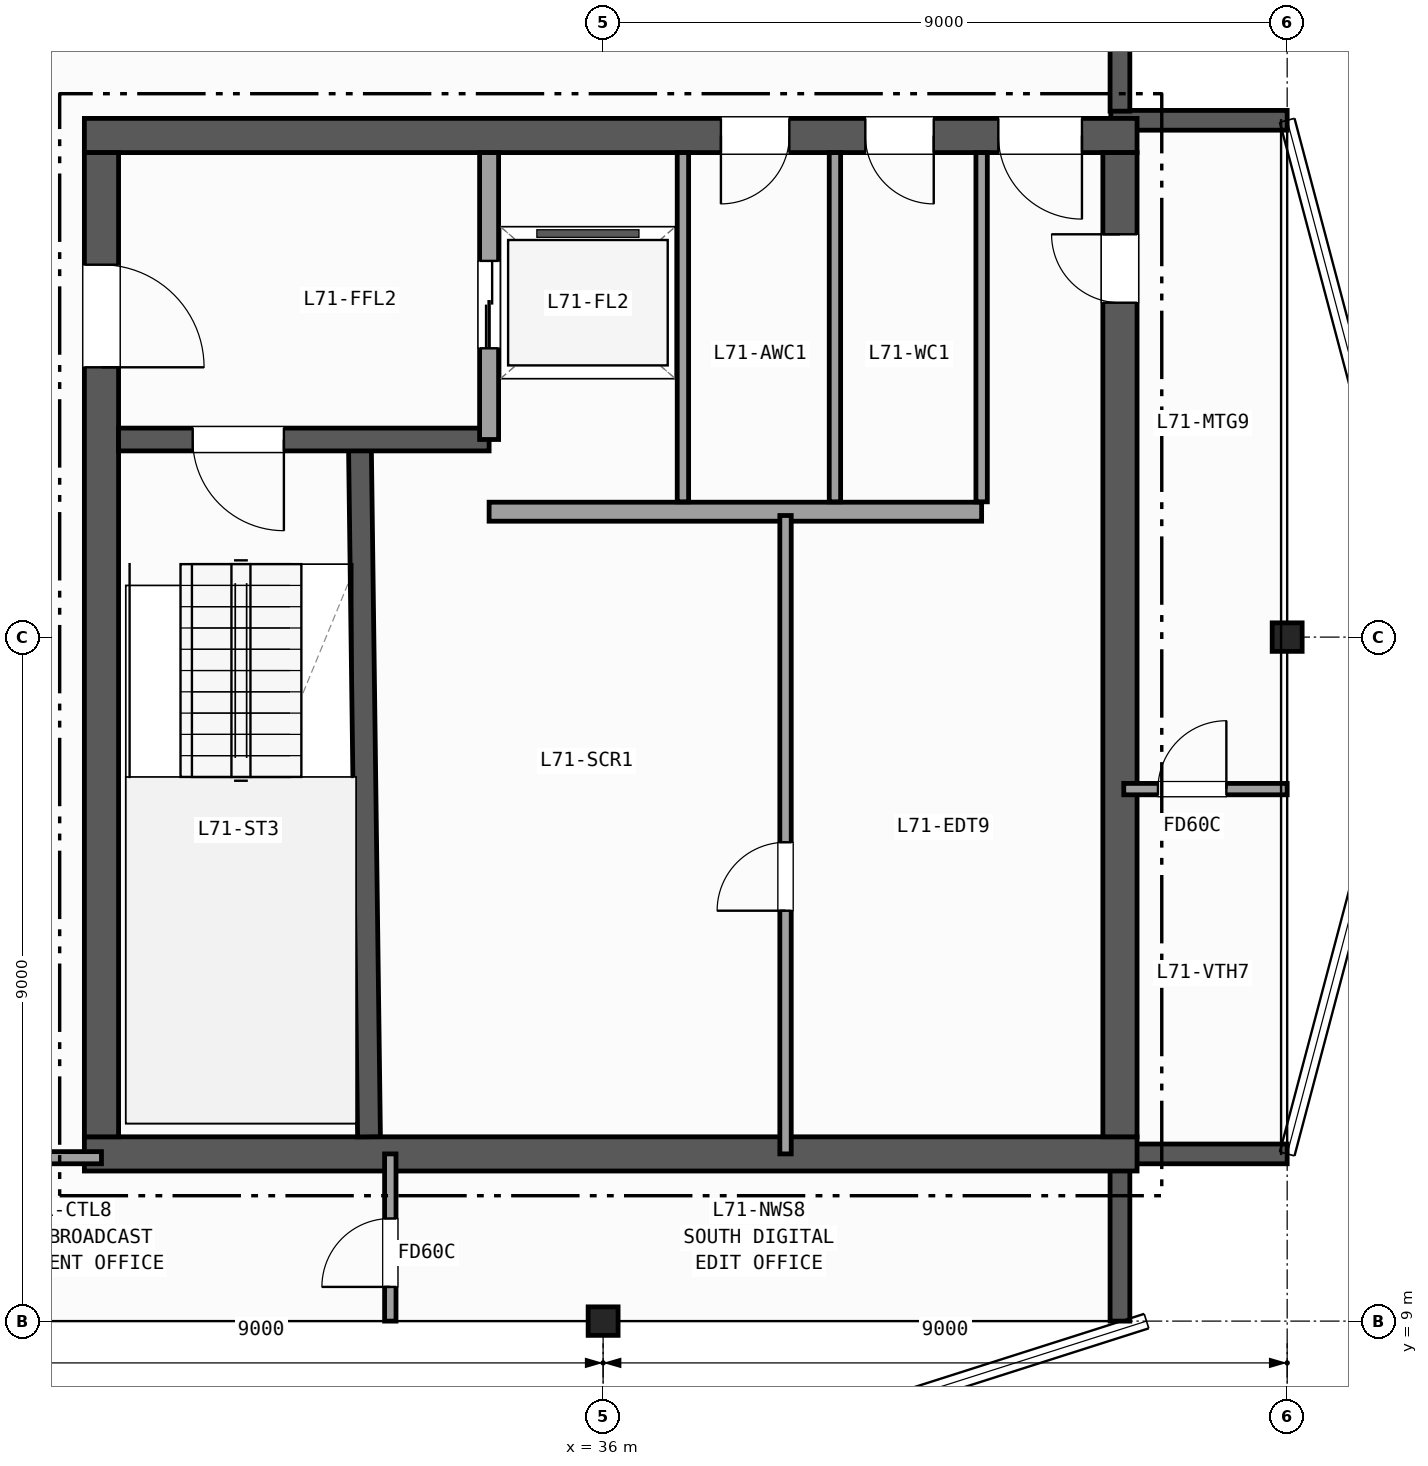
"""IFC4 building model, lengths in metres.
Left out: names, types, materials, properties, quantities, classifications, styles, units other than length and angle.
Written with IfcOpenShell. Run it as: python <this file> out.ifc"""

import sys

from ifc_helpers import new_model, si_unit, direction, frame, frame_2d, origin, origin_2d, place, context, subcontext, project, spatial, rectangle, i_section, extrude, element, fill, save


model = new_model("IFC4")
c1 = context("Model", 3, precision=1e-05, world=origin(), true_north=direction((0.0, 1.0)))
c2 = subcontext(c1, "Body", "Model", "MODEL_VIEW")
j1 = project(units=[si_unit("LENGTHUNIT", "METRE"), si_unit("PLANEANGLEUNIT", "RADIAN")], contexts=[c1])
p1 = place(None, origin())
s1 = spatial("IfcSite", under=j1, at=p1, CompositionType="ELEMENT")
p2 = place(p1, origin())
s2 = spatial("IfcBuilding", under=s1, at=p2, CompositionType="ELEMENT")
p3 = place(p2, frame((0.0, 0.0, 281.5)))
s3 = spatial("IfcBuildingStorey", under=s2, at=p3, CompositionType="ELEMENT", Elevation=281.5)
for number, where, z_axis, x_axis in (
    (1, (36.0, 9.0, 0.0), (0.0, 0.0, 1.0), (1.0, 0.0, 0.0)),
    (2, (45.0, 18.0, 0.0), (0.0, 0.0, 1.0), (1.0, 0.0, 0.0)),
):
    element("IfcColumn", number, at=place(p3, frame(where, z_axis=z_axis, x_axis=x_axis)), inside=s3, PredefinedType="COLUMN", context=c2, shape_type="SweptSolid", body=[
        extrude(i_section(OverallWidth=0.394, OverallDepth=0.375, WebThickness=0.017, FlangeThickness=0.028, FilletRadius=0.015, at=origin_2d()), origin(), (0.0, 0.0, 1.0), 3.7),
    ])
p4 = place(p3, frame((42.8, 9.0, 0.0), z_axis=(0.0, 0.0, 1.0), x_axis=(0.0, 1.0, 0.0)))
e3 = element("IfcWall", 3, at=p4, inside=s3, PredefinedType="SOLIDWALL", context=c2, shape_type="SweptSolid", body=[
    extrude(rectangle(XDim=2.08, YDim=0.26, at=frame_2d((1.04, 0.0))), origin(), (0.0, 0.0, 1.0), 3.37),
])
for number, where, z_axis, x_axis in (
    (4, (42.68, 11.2, 0.0), (0.0, 0.0, 1.0), (1.0, 0.0, 0.0)),
    (5, (45.0, 24.8, 0.0), (0.0, 0.0, 1.0), (-1.0, 0.0, 0.0)),
):
    element("IfcWall", number, at=place(p3, frame(where, z_axis=z_axis, x_axis=x_axis)), inside=s3, PredefinedType="SOLIDWALL", context=c2, shape_type="SweptSolid", body=[
        extrude(rectangle(XDim=2.32, YDim=0.26, at=frame_2d((1.16, 0.0))), origin(), (0.0, 0.0, 1.0), 3.37),
    ])
p5 = place(p3, frame((42.8, 24.92, 0.0), z_axis=(0.0, 0.0, 1.0), x_axis=(0.0, 1.0, 0.0)))
e6 = element("IfcWall", 6, at=p5, inside=s3, PredefinedType="SOLIDWALL", context=c2, shape_type="SweptSolid", body=[
    extrude(rectangle(XDim=2.08, YDim=0.26, at=frame_2d((1.04, 0.0))), origin(), (0.0, 0.0, 1.0), 3.37),
])
p6 = place(p3, frame((29.175, 11.2, 0.0), z_axis=(0.0, 0.0, 1.0), x_axis=(1.0, 0.0, 0.0)))
e7 = element("IfcWall", 7, at=p6, inside=s3, PredefinedType="SHEAR", context=c2, shape_type="SweptSolid", body=[
    extrude(rectangle(XDim=13.85, YDim=0.45, at=frame_2d((6.925, 0.0))), origin(), (0.0, 0.0, 1.0), 3.37),
])
p7 = place(p3, frame((43.025, 24.6, 0.0), z_axis=(0.0, 0.0, 1.0), x_axis=(-1.0, 0.0, 0.0)))
e8 = element("IfcWall", 8, at=p7, inside=s3, PredefinedType="SHEAR", context=c2, shape_type="SweptSolid", body=[
    extrude(rectangle(XDim=13.85, YDim=0.45, at=frame_2d((6.925, 0.0))), origin(), (0.0, 0.0, 1.0), 3.37),
])
p8 = place(p7, frame((0.725, 0.0, 0.0)))
e9 = element("IfcOpeningElement", 9, at=p8, cuts=e8, PredefinedType="OPENING", context=c2, shape_type="SweptSolid", body=[
    extrude(rectangle(XDim=1.1, YDim=2.15, at=frame_2d((0.55, 1.075))), frame((0.0, 0.235, 0.0), z_axis=(0.0, -1.0, 0.0), x_axis=(1.0, 0.0, 0.0)), (0.0, 0.0, 1.0), 0.47),
])
p9 = place(p7, frame((2.675, 0.0, 0.0)))
e10 = element("IfcOpeningElement", 10, at=p9, cuts=e8, PredefinedType="OPENING", context=c2, shape_type="SweptSolid", body=[
    extrude(rectangle(XDim=0.9, YDim=2.1, at=frame_2d((0.45, 1.05))), frame((0.0, 0.235, 0.0), z_axis=(0.0, -1.0, 0.0), x_axis=(1.0, 0.0, 0.0)), (0.0, 0.0, 1.0), 0.47),
])
p10 = place(p7, frame((4.575, 0.0, 0.0)))
e11 = element("IfcOpeningElement", 11, at=p10, cuts=e8, PredefinedType="OPENING", context=c2, shape_type="SweptSolid", body=[
    extrude(rectangle(XDim=0.9, YDim=2.1, at=frame_2d((0.45, 1.05))), frame((0.0, 0.235, 0.0), z_axis=(0.0, -1.0, 0.0), x_axis=(1.0, 0.0, 0.0)), (0.0, 0.0, 1.0), 0.47),
])
p11 = place(p3, frame((29.4, 24.375, 0.0), z_axis=(0.0, 0.0, 1.0), x_axis=(0.0, -1.0, 0.0)))
e12 = element("IfcWall", 12, at=p11, inside=s3, PredefinedType="SHEAR", context=c2, shape_type="SweptSolid", body=[
    extrude(rectangle(XDim=12.95, YDim=0.45, at=frame_2d((6.475, 0.0))), origin(), (0.0, 0.0, 1.0), 3.37),
])
p12 = place(p11, frame((1.475, 0.0, 0.0)))
e13 = element("IfcOpeningElement", 13, at=p12, cuts=e12, PredefinedType="OPENING", context=c2, shape_type="SweptSolid", body=[
    extrude(rectangle(XDim=1.35, YDim=2.15, at=frame_2d((0.675, 1.075))), frame((0.0, 0.235, 0.0), z_axis=(0.0, -1.0, 0.0), x_axis=(1.0, 0.0, 0.0)), (0.0, 0.0, 1.0), 0.47),
])
p13 = place(p3, frame((42.8, 11.425, 0.0), z_axis=(0.0, 0.0, 1.0), x_axis=(0.0, 1.0, 0.0)))
e14 = element("IfcWall", 14, at=p13, inside=s3, PredefinedType="SHEAR", context=c2, shape_type="SweptSolid", body=[
    extrude(rectangle(XDim=12.95, YDim=0.45, at=frame_2d((6.475, 0.0))), origin(), (0.0, 0.0, 1.0), 3.37),
])
p14 = place(p13, frame((10.975, 0.0, 0.0)))
e15 = element("IfcOpeningElement", 15, at=p14, cuts=e14, PredefinedType="OPENING", context=c2, shape_type="SweptSolid", body=[
    extrude(rectangle(XDim=0.9, YDim=2.1, at=frame_2d((0.45, 1.05))), frame((0.0, 0.235, 0.0), z_axis=(0.0, -1.0, 0.0), x_axis=(1.0, 0.0, 0.0)), (0.0, 0.0, 1.0), 0.47),
])
p15 = place(p3, frame((32.92, 11.425, 0.0), z_axis=(0.0, 0.0, 1.0), x_axis=(-0.013135638869, 0.999913723774, 0.0)))
e16 = element("IfcWall", 16, at=p15, inside=s3, PredefinedType="SHEAR", context=c2, shape_type="SweptSolid", body=[
    extrude(rectangle(XDim=9.126, YDim=0.3, at=frame_2d((4.563, 0.0))), origin(), (0.0, 0.0, 1.0), 3.37),
])
p16 = place(p3, frame((34.5, 20.6, 0.0), z_axis=(0.0, 0.0, 1.0), x_axis=(-1.0, 0.0, 0.0)))
e17 = element("IfcWall", 17, at=p16, inside=s3, PredefinedType="SHEAR", context=c2, shape_type="SweptSolid", body=[
    extrude(rectangle(XDim=4.875, YDim=0.3, at=frame_2d((2.438, 0.0))), origin(), (0.0, 0.0, 1.0), 3.37),
])
p17 = place(p16, frame((2.7, 0.0, 0.0)))
e18 = element("IfcOpeningElement", 18, at=p17, cuts=e17, PredefinedType="OPENING", context=c2, shape_type="SweptSolid", body=[
    extrude(rectangle(XDim=1.2, YDim=2.15, at=frame_2d((0.6, 1.075))), frame((0.0, 0.16, 0.0), z_axis=(0.0, -1.0, 0.0), x_axis=(1.0, 0.0, 0.0)), (0.0, 0.0, 1.0), 0.32),
])
p18 = place(p3, frame((34.5, 20.6, 0.0), z_axis=(0.0, 0.0, 1.0), x_axis=(0.0, 1.0, 0.0)))
e19 = element("IfcWall", 19, at=p18, inside=s3, PredefinedType="PARTITIONING", context=c2, shape_type="SweptSolid", body=[
    extrude(rectangle(XDim=3.775, YDim=0.25, at=frame_2d((1.887, 0.0))), origin(), (0.0, 0.0, 1.0), 3.37),
])
p19 = place(p18, frame((1.2, 0.0, 0.0)))
e20 = element("IfcOpeningElement", 20, at=p19, cuts=e19, PredefinedType="OPENING", context=c2, shape_type="SweptSolid", body=[
    extrude(rectangle(XDim=1.15, YDim=2.15, at=frame_2d((0.575, 1.075))), frame((0.0, 0.135, 0.0), z_axis=(0.0, -1.0, 0.0), x_axis=(1.0, 0.0, 0.0)), (0.0, 0.0, 1.0), 0.27),
])
p20 = place(p3, frame((34.5, 19.65, 0.0), z_axis=(0.0, 0.0, 1.0), x_axis=(1.0, 0.0, 0.0)))
e21 = element("IfcWall", 21, at=p20, inside=s3, PredefinedType="PARTITIONING", context=c2, shape_type="SweptSolid", body=[
    extrude(rectangle(XDim=6.48, YDim=0.25, at=frame_2d((3.24, 0.0))), origin(), (0.0, 0.0, 1.0), 3.37),
])
p21 = place(p3, frame((38.4, 11.2, 0.0), z_axis=(0.0, 0.0, 1.0), x_axis=(0.0, 1.0, 0.0)))
e22 = element("IfcWall", 22, at=p21, inside=s3, PredefinedType="PARTITIONING", context=c2, shape_type="SweptSolid", body=[
    extrude(rectangle(XDim=8.4, YDim=0.15, at=frame_2d((4.2, 0.0))), origin(), (0.0, 0.0, 1.0), 3.37),
])
p22 = place(p21, frame((3.2, 0.0, 0.0)))
e23 = element("IfcOpeningElement", 23, at=p22, cuts=e22, PredefinedType="OPENING", context=c2, shape_type="SweptSolid", body=[
    extrude(rectangle(XDim=0.9, YDim=2.1, at=frame_2d((0.45, 1.05))), frame((0.0, 0.085, 0.0), z_axis=(0.0, -1.0, 0.0), x_axis=(1.0, 0.0, 0.0)), (0.0, 0.0, 1.0), 0.17),
])
for number, where, z_axis, x_axis in (
    (24, (37.05, 19.78, 0.0), (0.0, 0.0, 1.0), (0.0, 1.0, 0.0)),
    (25, (39.05, 19.78, 0.0), (0.0, 0.0, 1.0), (0.0, 1.0, 0.0)),
    (26, (40.98, 19.78, 0.0), (0.0, 0.0, 1.0), (0.0, 1.0, 0.0)),
):
    element("IfcWall", number, at=place(p3, frame(where, z_axis=z_axis, x_axis=x_axis)), inside=s3, PredefinedType="PARTITIONING", context=c2, shape_type="SweptSolid", body=[
        extrude(rectangle(XDim=4.595, YDim=0.15, at=frame_2d((2.297, 0.0))), origin(), (0.0, 0.0, 1.0), 3.37),
    ])
p23 = place(p3, frame((24.65, 11.15, 0.0), z_axis=(0.0, 0.0, 1.0), x_axis=(1.0, 0.0, 0.0)))
e27 = element("IfcWall", 27, at=p23, inside=s3, PredefinedType="PARTITIONING", context=c2, shape_type="SweptSolid", body=[
    extrude(rectangle(XDim=4.75, YDim=0.16, at=frame_2d((2.375, 0.0))), origin(), (0.0, 0.0, 1.0), 2.742),
])
p24 = place(p23, frame((1.2, 0.0, 0.0)))
e28 = element("IfcOpeningElement", 28, at=p24, cuts=e27, PredefinedType="OPENING", context=c2, shape_type="SweptSolid", body=[
    extrude(rectangle(XDim=0.86, YDim=2.05, at=frame_2d((0.43, 1.025))), frame((0.0, 0.09, 0.0), z_axis=(0.0, -1.0, 0.0), x_axis=(1.0, 0.0, 0.0)), (0.0, 0.0, 1.0), 0.18),
])
p25 = place(p3, frame((33.2, 9.0, 0.0), z_axis=(0.0, 0.0, 1.0), x_axis=(0.0, 1.0, 0.0)))
e29 = element("IfcWall", 29, at=p25, inside=s3, PredefinedType="PARTITIONING", context=c2, shape_type="SweptSolid", body=[
    extrude(rectangle(XDim=2.2, YDim=0.15, at=frame_2d((1.1, 0.0))), origin(), (0.0, 0.0, 1.0), 2.657),
])
p26 = place(p25, frame((0.45, 0.0, 0.0)))
e30 = element("IfcOpeningElement", 30, at=p26, cuts=e29, PredefinedType="OPENING", context=c2, shape_type="SweptSolid", body=[
    extrude(rectangle(XDim=0.9, YDim=2.1, at=frame_2d((0.45, 1.05))), frame((0.0, 0.085, 0.0), z_axis=(0.0, -1.0, 0.0), x_axis=(1.0, 0.0, 0.0)), (0.0, 0.0, 1.0), 0.17),
])
p27 = place(p3, frame((42.85, 16.0, 0.0), z_axis=(0.0, 0.0, 1.0), x_axis=(1.0, 0.0, 0.0)))
e31 = element("IfcWall", 31, at=p27, inside=s3, PredefinedType="PARTITIONING", context=c2, shape_type="SweptSolid", body=[
    extrude(rectangle(XDim=2.15, YDim=0.15, at=frame_2d((1.075, 0.0))), origin(), (0.0, 0.0, 1.0), 3.37),
])
p28 = place(p27, frame((0.45, 0.0, 0.0)))
e32 = element("IfcOpeningElement", 32, at=p28, cuts=e31, PredefinedType="OPENING", context=c2, shape_type="SweptSolid", body=[
    extrude(rectangle(XDim=0.9, YDim=2.1, at=frame_2d((0.45, 1.05))), frame((0.0, 0.085, 0.0), z_axis=(0.0, -1.0, 0.0), x_axis=(1.0, 0.0, 0.0)), (0.0, 0.0, 1.0), 0.17),
])
p29 = place(p17, origin())
e33 = element("IfcDoor", 33, at=p29, inside=s3, OperationType="SINGLE_SWING_LEFT", PredefinedType="DOOR", context=c2, shape_type="SweptSolid", body=[
    extrude(rectangle(XDim=1.2, YDim=2.15, at=frame_2d((0.6, 1.075))), frame((0.0, 0.025, 0.0), z_axis=(0.0, -1.0, 0.0), x_axis=(1.0, 0.0, 0.0)), (0.0, 0.0, 1.0), 0.05),
])
fill(e18, e33)
p30 = place(p12, origin())
e34 = element("IfcDoor", 34, at=p30, inside=s3, OperationType="SINGLE_SWING_RIGHT", PredefinedType="DOOR", context=c2, shape_type="SweptSolid", body=[
    extrude(rectangle(XDim=1.35, YDim=2.15, at=frame_2d((0.675, 1.075))), frame((0.0, 0.025, 0.0), z_axis=(0.0, -1.0, 0.0), x_axis=(1.0, 0.0, 0.0)), (0.0, 0.0, 1.0), 0.05),
])
fill(e13, e34)
p31 = place(p14, origin())
e35 = element("IfcDoor", 35, at=p31, inside=s3, OperationType="SINGLE_SWING_RIGHT", PredefinedType="DOOR", context=c2, shape_type="SweptSolid", body=[
    extrude(rectangle(XDim=0.9, YDim=2.1, at=frame_2d((0.45, 1.05))), frame((0.0, 0.025, 0.0), z_axis=(0.0, -1.0, 0.0), x_axis=(1.0, 0.0, 0.0)), (0.0, 0.0, 1.0), 0.05),
])
fill(e15, e35)
p32 = place(p8, origin())
e36 = element("IfcDoor", 36, at=p32, inside=s3, OperationType="SINGLE_SWING_LEFT", PredefinedType="DOOR", context=c2, shape_type="SweptSolid", body=[
    extrude(rectangle(XDim=1.1, YDim=2.15, at=frame_2d((0.55, 1.075))), frame((0.0, 0.025, 0.0), z_axis=(0.0, -1.0, 0.0), x_axis=(1.0, 0.0, 0.0)), (0.0, 0.0, 1.0), 0.05),
])
fill(e9, e36)
p33 = place(p9, origin())
e37 = element("IfcDoor", 37, at=p33, inside=s3, OperationType="SINGLE_SWING_LEFT", PredefinedType="DOOR", context=c2, shape_type="SweptSolid", body=[
    extrude(rectangle(XDim=0.9, YDim=2.1, at=frame_2d((0.45, 1.05))), frame((0.0, 0.025, 0.0), z_axis=(0.0, -1.0, 0.0), x_axis=(1.0, 0.0, 0.0)), (0.0, 0.0, 1.0), 0.05),
])
fill(e10, e37)
p34 = place(p10, origin())
e38 = element("IfcDoor", 38, at=p34, inside=s3, OperationType="SINGLE_SWING_RIGHT", PredefinedType="DOOR", context=c2, shape_type="SweptSolid", body=[
    extrude(rectangle(XDim=0.9, YDim=2.1, at=frame_2d((0.45, 1.05))), frame((0.0, 0.025, 0.0), z_axis=(0.0, -1.0, 0.0), x_axis=(1.0, 0.0, 0.0)), (0.0, 0.0, 1.0), 0.05),
])
fill(e11, e38)
p35 = place(p19, origin())
e39 = element("IfcDoor", 39, at=p35, inside=s3, OperationType="DOUBLE_DOOR_SLIDING", PredefinedType="DOOR", context=c2, shape_type="SweptSolid", body=[
    extrude(rectangle(XDim=1.15, YDim=2.15, at=frame_2d((0.575, 1.075))), frame((0.0, 0.025, 0.0), z_axis=(0.0, -1.0, 0.0), x_axis=(1.0, 0.0, 0.0)), (0.0, 0.0, 1.0), 0.05),
])
fill(e20, e39)
p36 = place(p22, origin())
e40 = element("IfcDoor", 40, at=p36, inside=s3, OperationType="SINGLE_SWING_LEFT", PredefinedType="DOOR", context=c2, shape_type="SweptSolid", body=[
    extrude(rectangle(XDim=0.9, YDim=2.1, at=frame_2d((0.45, 1.05))), frame((0.0, 0.025, 0.0), z_axis=(0.0, -1.0, 0.0), x_axis=(1.0, 0.0, 0.0)), (0.0, 0.0, 1.0), 0.05),
])
fill(e23, e40)
p37 = place(p26, origin())
e41 = element("IfcDoor", 41, at=p37, inside=s3, OperationType="SINGLE_SWING_LEFT", PredefinedType="DOOR", context=c2, shape_type="SweptSolid", body=[
    extrude(rectangle(XDim=0.9, YDim=2.1, at=frame_2d((0.45, 1.05))), frame((0.0, 0.025, 0.0), z_axis=(0.0, -1.0, 0.0), x_axis=(1.0, 0.0, 0.0)), (0.0, 0.0, 1.0), 0.05),
])
fill(e30, e41)
p38 = place(p28, origin())
e42 = element("IfcDoor", 42, at=p38, inside=s3, OperationType="SINGLE_SWING_RIGHT", PredefinedType="DOOR", context=c2, shape_type="SweptSolid", body=[
    extrude(rectangle(XDim=0.9, YDim=2.1, at=frame_2d((0.45, 1.05))), frame((0.0, 0.025, 0.0), z_axis=(0.0, -1.0, 0.0), x_axis=(1.0, 0.0, 0.0)), (0.0, 0.0, 1.0), 0.05),
])
fill(e32, e42)
save(model, sys.argv[1])
